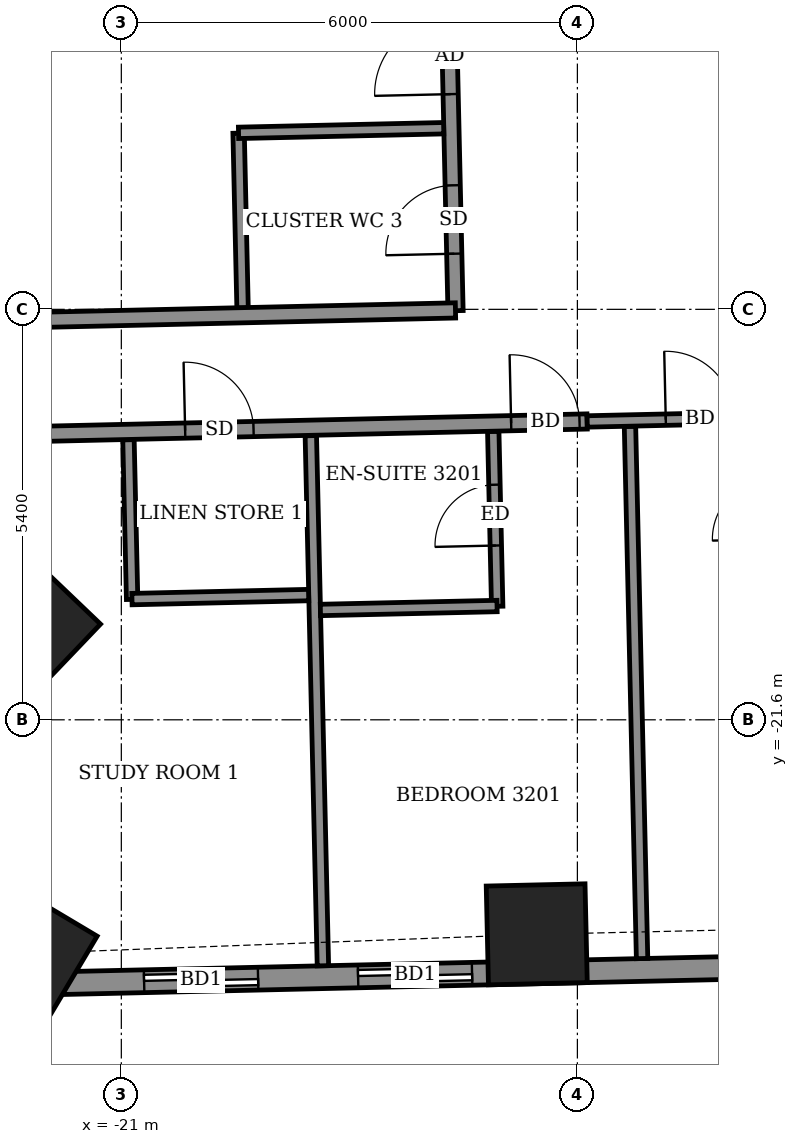
"""IFC4 building model, lengths in metres.
Left out: names, types, materials, properties, quantities, classifications, styles, units other than length and angle.
Written with IfcOpenShell. Run it as: python <this file> out.ifc"""

import sys

from ifc_helpers import new_model, si_unit, direction, frame, frame_2d, origin, origin_2d, place, context, subcontext, project, spatial, rectangle, extrude, element, fill, save


model = new_model("IFC4")
c1 = context("Model", 3, precision=1e-05, world=origin(), true_north=direction((0.0, 1.0)))
c2 = subcontext(c1, "Body", "Model", "MODEL_VIEW")
j1 = project(units=[si_unit("LENGTHUNIT", "METRE"), si_unit("PLANEANGLEUNIT", "RADIAN")], contexts=[c1])
p1 = place(None, origin())
s1 = spatial("IfcSite", under=j1, at=p1, CompositionType="ELEMENT")
p2 = place(p1, origin())
s2 = spatial("IfcBuilding", under=s1, at=p2, CompositionType="ELEMENT")
p3 = place(p2, frame((0.0, 0.0, 130.1)))
s3 = spatial("IfcBuildingStorey", under=s2, at=p3, CompositionType="ELEMENT", Elevation=130.1)
for number, where, z_axis, x_axis in (
    (1, (-22.193, -20.362, -0.55), (0.0, 0.0, 1.0), (0.723, -0.691, 0.0)),
    (2, (-22.209, -24.672, -0.55), (0.0, 0.0, 1.0), (0.859, -0.512, 0.0)),
    (3, (-15.535, -24.422, -0.55), (0.0, 0.0, 1.0), (1.0, 0.023, 0.0)),
):
    element("IfcColumn", number, at=place(p3, frame(where, z_axis=z_axis, x_axis=x_axis)), inside=s3, PredefinedType="COLUMN", context=c2, shape_type="SweptSolid", body=[
        extrude(rectangle(XDim=1.3, YDim=1.3, at=origin_2d()), origin(), (0.0, 0.0, 1.0), 3.6),
    ])
p4 = place(p3, frame((-22.396, -25.078, 0.0), z_axis=(0.0, 0.0, 1.0), x_axis=(0.99974279854, 0.022678993965, 0.0)))
e4 = element("IfcWall", 4, at=p4, inside=s3, PredefinedType="SOLIDWALL", context=c2, shape_type="SweptSolid", body=[
    extrude(rectangle(XDim=41.844, YDim=0.3, at=frame_2d((20.922, 0.0))), origin(), (0.0, 0.0, 1.0), 3.05),
])
p5 = place(p4, frame((1.696, 0.0, 0.0)))
e5 = element("IfcOpeningElement", 5, at=p5, cuts=e4, PredefinedType="OPENING", context=c2, shape_type="SweptSolid", body=[
    extrude(rectangle(XDim=1.5, YDim=2.4, at=frame_2d((0.75, 1.2))), frame((0.0, 0.16, 0.0), z_axis=(0.0, -1.0, 0.0), x_axis=(1.0, 0.0, 0.0)), (0.0, 0.0, 1.0), 0.32),
])
p6 = place(p4, frame((4.512, 0.0, 0.0)))
e6 = element("IfcOpeningElement", 6, at=p6, cuts=e4, PredefinedType="OPENING", context=c2, shape_type="SweptSolid", body=[
    extrude(rectangle(XDim=1.5, YDim=2.4, at=frame_2d((0.75, 1.2))), frame((0.0, 0.16, 0.0), z_axis=(0.0, -1.0, 0.0), x_axis=(1.0, 0.0, 0.0)), (0.0, 0.0, 1.0), 0.32),
])
p7 = place(p4, frame((9.625, 0.0, 0.0)))
e7 = element("IfcOpeningElement", 7, at=p7, cuts=e4, PredefinedType="OPENING", context=c2, shape_type="SweptSolid", body=[
    extrude(rectangle(XDim=1.5, YDim=2.4, at=frame_2d((0.75, 1.2))), frame((0.0, 0.16, 0.0), z_axis=(0.0, -1.0, 0.0), x_axis=(1.0, 0.0, 0.0)), (0.0, 0.0, 1.0), 0.32),
])
p8 = place(p4, frame((14.749, 0.0, 0.0)))
e8 = element("IfcOpeningElement", 8, at=p8, cuts=e4, PredefinedType="OPENING", context=c2, shape_type="SweptSolid", body=[
    extrude(rectangle(XDim=1.5, YDim=2.4, at=frame_2d((0.75, 1.2))), frame((0.0, 0.16, 0.0), z_axis=(0.0, -1.0, 0.0), x_axis=(1.0, 0.0, 0.0)), (0.0, 0.0, 1.0), 0.32),
])
p9 = place(p4, frame((17.861, 0.0, 0.0)))
e9 = element("IfcOpeningElement", 9, at=p9, cuts=e4, PredefinedType="OPENING", context=c2, shape_type="SweptSolid", body=[
    extrude(rectangle(XDim=1.5, YDim=2.4, at=frame_2d((0.75, 1.2))), frame((0.0, 0.16, 0.0), z_axis=(0.0, -1.0, 0.0), x_axis=(1.0, 0.0, 0.0)), (0.0, 0.0, 1.0), 0.32),
])
p10 = place(p4, frame((22.486, 0.0, 0.0)))
e10 = element("IfcOpeningElement", 10, at=p10, cuts=e4, PredefinedType="OPENING", context=c2, shape_type="SweptSolid", body=[
    extrude(rectangle(XDim=1.5, YDim=2.4, at=frame_2d((0.75, 1.2))), frame((0.0, 0.16, 0.0), z_axis=(0.0, -1.0, 0.0), x_axis=(1.0, 0.0, 0.0)), (0.0, 0.0, 1.0), 0.32),
])
p11 = place(p4, frame((25.598, 0.0, 0.0)))
e11 = element("IfcOpeningElement", 11, at=p11, cuts=e4, PredefinedType="OPENING", context=c2, shape_type="SweptSolid", body=[
    extrude(rectangle(XDim=1.5, YDim=2.4, at=frame_2d((0.75, 1.2))), frame((0.0, 0.16, 0.0), z_axis=(0.0, -1.0, 0.0), x_axis=(1.0, 0.0, 0.0)), (0.0, 0.0, 1.0), 0.32),
])
p12 = place(p4, frame((30.7, 0.0, 0.0)))
e12 = element("IfcOpeningElement", 12, at=p12, cuts=e4, PredefinedType="OPENING", context=c2, shape_type="SweptSolid", body=[
    extrude(rectangle(XDim=1.5, YDim=2.4, at=frame_2d((0.75, 1.2))), frame((0.0, 0.16, 0.0), z_axis=(0.0, -1.0, 0.0), x_axis=(1.0, 0.0, 0.0)), (0.0, 0.0, 1.0), 0.32),
])
p13 = place(p4, frame((35.81, 0.0, 0.0)))
e13 = element("IfcOpeningElement", 13, at=p13, cuts=e4, PredefinedType="OPENING", context=c2, shape_type="SweptSolid", body=[
    extrude(rectangle(XDim=1.5, YDim=2.4, at=frame_2d((0.75, 1.2))), frame((0.0, 0.16, 0.0), z_axis=(0.0, -1.0, 0.0), x_axis=(1.0, 0.0, 0.0)), (0.0, 0.0, 1.0), 0.32),
])
p14 = place(p4, frame((38.124, 0.0, 0.9)))
e14 = element("IfcOpeningElement", 14, at=p14, cuts=e4, PredefinedType="OPENING", context=c2, shape_type="SweptSolid", body=[
    extrude(rectangle(XDim=2.4, YDim=1.5, at=frame_2d((1.2, 0.75))), frame((0.0, 0.16, 0.0), z_axis=(0.0, -1.0, 0.0), x_axis=(1.0, 0.0, 0.0)), (0.0, 0.0, 1.0), 0.32),
])
p15 = place(p3, frame((-18.348, -24.836, 0.0), z_axis=(0.0, 0.0, 1.0), x_axis=(-0.02281919218, 0.999739608332, 0.0)))
e15 = element("IfcWall", 15, at=p15, inside=s3, PredefinedType="PARTITIONING", context=c2, shape_type="SweptSolid", body=[
    extrude(rectangle(XDim=6.976, YDim=0.15, at=frame_2d((3.488, 0.0))), origin(), (0.0, 0.0, 1.0), 2.55),
])
p16 = place(p3, frame((-14.149, -24.741, 0.0), z_axis=(0.0, 0.0, 1.0), x_axis=(-0.022734078158, 0.999741547446, 0.0)))
e16 = element("IfcWall", 16, at=p16, inside=s3, PredefinedType="PARTITIONING", context=c2, shape_type="SweptSolid", body=[
    extrude(rectangle(XDim=7.002, YDim=0.15, at=frame_2d((3.501, 0.0))), origin(), (0.0, 0.0, 1.0), 2.55),
])
p17 = place(p3, frame((-16.055, -20.107, 0.0), z_axis=(0.0, 0.0, 1.0), x_axis=(-0.022603288534, 0.999744513037, 0.0)))
e17 = element("IfcWall", 17, at=p17, inside=s3, PredefinedType="PARTITIONING", context=c2, shape_type="SweptSolid", body=[
    extrude(rectangle(XDim=2.301, YDim=0.15, at=frame_2d((1.15, 0.0))), origin(), (0.0, 0.0, 1.0), 3.05),
])
p18 = place(p17, frame((0.8, 0.0, 0.0)))
e18 = element("IfcOpeningElement", 18, at=p18, cuts=e17, PredefinedType="OPENING", context=c2, shape_type="SweptSolid", body=[
    extrude(rectangle(XDim=0.8, YDim=2.1, at=frame_2d((0.4, 1.05))), frame((0.0, 0.085, 0.0), z_axis=(0.0, -1.0, 0.0), x_axis=(1.0, 0.0, 0.0)), (0.0, 0.0, 1.0), 0.17),
])
p19 = place(p3, frame((-18.381, -20.155, 0.0), z_axis=(0.0, 0.0, 1.0), x_axis=(0.999749797124, 0.022368351553, 0.0)))
e19 = element("IfcWall", 19, at=p19, inside=s3, PredefinedType="PARTITIONING", context=c2, shape_type="SweptSolid", body=[
    extrude(rectangle(XDim=2.325, YDim=0.15, at=frame_2d((1.162, 0.0))), origin(), (0.0, 0.0, 1.0), 3.05),
])
p20 = place(p3, frame((-20.858, -20.016, 0.0), z_axis=(0.0, 0.0, 1.0), x_axis=(-0.022895647347, 0.999737860308, 0.0)))
e20 = element("IfcWall", 20, at=p20, inside=s3, PredefinedType="PARTITIONING", context=c2, shape_type="SweptSolid", body=[
    extrude(rectangle(XDim=2.101, YDim=0.15, at=frame_2d((1.05, 0.0))), origin(), (0.0, 0.0, 1.0), 3.05),
])
p21 = place(p3, frame((-20.86, -20.012, 0.0), z_axis=(0.0, 0.0, 1.0), x_axis=(0.99974031529, 0.022788198363, 0.0)))
e21 = element("IfcWall", 21, at=p21, inside=s3, PredefinedType="PARTITIONING", context=c2, shape_type="SweptSolid", body=[
    extrude(rectangle(XDim=2.325, YDim=0.15, at=frame_2d((1.162, 0.0))), origin(), (0.0, 0.0, 1.0), 3.05),
])
p22 = place(p3, frame((-25.709, -17.921, 0.0), z_axis=(0.0, 0.0, 1.0), x_axis=(0.999742764922, 0.022680475901, 0.0)))
e22 = element("IfcWall", 22, at=p22, inside=s3, PredefinedType="PARTITIONING", context=c2, shape_type="SweptSolid", body=[
    extrude(rectangle(XDim=10.84, YDim=0.2, at=frame_2d((5.42, 0.0))), origin(), (0.0, 0.0, 1.0), 3.05),
])
p23 = place(p22, frame((1.2, 0.0, 0.0)))
e23 = element("IfcOpeningElement", 23, at=p23, cuts=e22, PredefinedType="OPENING", context=c2, shape_type="SweptSolid", body=[
    extrude(rectangle(XDim=1.0, YDim=2.1, at=frame_2d((0.5, 1.05))), frame((0.0, 0.11, 0.0), z_axis=(0.0, -1.0, 0.0), x_axis=(1.0, 0.0, 0.0)), (0.0, 0.0, 1.0), 0.22),
])
p24 = place(p22, frame((5.55, 0.0, 0.0)))
e24 = element("IfcOpeningElement", 24, at=p24, cuts=e22, PredefinedType="OPENING", context=c2, shape_type="SweptSolid", body=[
    extrude(rectangle(XDim=0.9, YDim=2.1, at=frame_2d((0.45, 1.05))), frame((0.0, 0.11, 0.0), z_axis=(0.0, -1.0, 0.0), x_axis=(1.0, 0.0, 0.0)), (0.0, 0.0, 1.0), 0.22),
])
p25 = place(p22, frame((9.84, 0.0, 0.0)))
e25 = element("IfcOpeningElement", 25, at=p25, cuts=e22, PredefinedType="OPENING", context=c2, shape_type="SweptSolid", body=[
    extrude(rectangle(XDim=0.9, YDim=2.1, at=frame_2d((0.45, 1.05))), frame((0.0, 0.11, 0.0), z_axis=(0.0, -1.0, 0.0), x_axis=(1.0, 0.0, 0.0)), (0.0, 0.0, 1.0), 0.22),
])
p26 = place(p3, frame((-14.871, -17.675, 0.0), z_axis=(0.0, 0.0, 1.0), x_axis=(0.999742359486, 0.02269834024, 0.0)))
e26 = element("IfcWall", 26, at=p26, inside=s3, PredefinedType="PARTITIONING", context=c2, shape_type="SweptSolid", body=[
    extrude(rectangle(XDim=30.536, YDim=0.15, at=frame_2d((15.268, 0.0))), origin(), (0.0, 0.0, 1.0), 3.05),
])
p27 = place(p26, frame((1.034, 0.0, 0.0)))
e27 = element("IfcOpeningElement", 27, at=p27, cuts=e26, PredefinedType="OPENING", context=c2, shape_type="SweptSolid", body=[
    extrude(rectangle(XDim=0.9, YDim=2.1, at=frame_2d((0.45, 1.05))), frame((0.0, 0.085, 0.0), z_axis=(0.0, -1.0, 0.0), x_axis=(1.0, 0.0, 0.0)), (0.0, 0.0, 1.0), 0.17),
])
p28 = place(p26, frame((7.659, 0.0, 0.0)))
e28 = element("IfcOpeningElement", 28, at=p28, cuts=e26, PredefinedType="OPENING", context=c2, shape_type="SweptSolid", body=[
    extrude(rectangle(XDim=0.9, YDim=2.1, at=frame_2d((0.45, 1.05))), frame((0.0, 0.085, 0.0), z_axis=(0.0, -1.0, 0.0), x_axis=(1.0, 0.0, 0.0)), (0.0, 0.0, 1.0), 0.17),
])
p29 = place(p26, frame((9.459, 0.0, 0.0)))
e29 = element("IfcOpeningElement", 29, at=p29, cuts=e26, PredefinedType="OPENING", context=c2, shape_type="SweptSolid", body=[
    extrude(rectangle(XDim=0.9, YDim=2.1, at=frame_2d((0.45, 1.05))), frame((0.0, 0.085, 0.0), z_axis=(0.0, -1.0, 0.0), x_axis=(1.0, 0.0, 0.0)), (0.0, 0.0, 1.0), 0.17),
])
p30 = place(p26, frame((16.084, 0.0, 0.0)))
e30 = element("IfcOpeningElement", 30, at=p30, cuts=e26, PredefinedType="OPENING", context=c2, shape_type="SweptSolid", body=[
    extrude(rectangle(XDim=0.9, YDim=2.1, at=frame_2d((0.45, 1.05))), frame((0.0, 0.085, 0.0), z_axis=(0.0, -1.0, 0.0), x_axis=(1.0, 0.0, 0.0)), (0.0, 0.0, 1.0), 0.17),
])
p31 = place(p26, frame((17.909, 0.0, 0.0)))
e31 = element("IfcOpeningElement", 31, at=p31, cuts=e26, PredefinedType="OPENING", context=c2, shape_type="SweptSolid", body=[
    extrude(rectangle(XDim=0.9, YDim=2.1, at=frame_2d((0.45, 1.05))), frame((0.0, 0.085, 0.0), z_axis=(0.0, -1.0, 0.0), x_axis=(1.0, 0.0, 0.0)), (0.0, 0.0, 1.0), 0.17),
])
p32 = place(p26, frame((24.509, 0.0, 0.0)))
e32 = element("IfcOpeningElement", 32, at=p32, cuts=e26, PredefinedType="OPENING", context=c2, shape_type="SweptSolid", body=[
    extrude(rectangle(XDim=0.9, YDim=2.1, at=frame_2d((0.45, 1.05))), frame((0.0, 0.085, 0.0), z_axis=(0.0, -1.0, 0.0), x_axis=(1.0, 0.0, 0.0)), (0.0, 0.0, 1.0), 0.17),
])
p33 = place(p26, frame((26.309, 0.0, 0.0)))
e33 = element("IfcOpeningElement", 33, at=p33, cuts=e26, PredefinedType="OPENING", context=c2, shape_type="SweptSolid", body=[
    extrude(rectangle(XDim=0.9, YDim=2.1, at=frame_2d((0.45, 1.05))), frame((0.0, 0.085, 0.0), z_axis=(0.0, -1.0, 0.0), x_axis=(1.0, 0.0, 0.0)), (0.0, 0.0, 1.0), 0.17),
])
p34 = place(p3, frame((-19.405, -16.182, 0.0), z_axis=(0.0, 0.0, 1.0), x_axis=(-0.022605686808, 0.999744458811, 0.0)))
e34 = element("IfcWall", 34, at=p34, inside=s3, PredefinedType="PARTITIONING", context=c2, shape_type="SweptSolid", body=[
    extrude(rectangle(XDim=2.3, YDim=0.15, at=frame_2d((1.15, 0.0))), origin(), (0.0, 0.0, 1.0), 3.05),
])
p35 = place(p3, frame((-16.603, -16.218, 0.0), z_axis=(0.0, 0.0, 1.0), x_axis=(-0.022698146637, 0.999742363881, 0.0)))
e35 = element("IfcWall", 35, at=p35, inside=s3, PredefinedType="PARTITIONING", context=c2, shape_type="SweptSolid", body=[
    extrude(rectangle(XDim=28.374, YDim=0.2, at=frame_2d((14.187, 0.0))), origin(), (0.0, 0.0, 1.0), 3.05),
])
p36 = place(p35, frame((24.537, 0.0, 0.0)))
e36 = element("IfcOpeningElement", 36, at=p36, cuts=e35, PredefinedType="OPENING", context=c2, shape_type="SweptSolid", body=[
    extrude(rectangle(XDim=1.0, YDim=2.1, at=frame_2d((0.5, 1.05))), frame((0.0, 0.11, 0.0), z_axis=(0.0, -1.0, 0.0), x_axis=(1.0, 0.0, 0.0)), (0.0, 0.0, 1.0), 0.22),
])
p37 = place(p35, frame((26.724, 0.0, 0.0)))
e37 = element("IfcOpeningElement", 37, at=p37, cuts=e35, PredefinedType="OPENING", context=c2, shape_type="SweptSolid", body=[
    extrude(rectangle(XDim=0.9, YDim=2.1, at=frame_2d((0.45, 1.05))), frame((0.0, 0.11, 0.0), z_axis=(0.0, -1.0, 0.0), x_axis=(1.0, 0.0, 0.0)), (0.0, 0.0, 1.0), 0.22),
])
p38 = place(p35, frame((22.099, 0.0, 0.0)))
e38 = element("IfcOpeningElement", 38, at=p38, cuts=e35, PredefinedType="OPENING", context=c2, shape_type="SweptSolid", body=[
    extrude(rectangle(XDim=1.0, YDim=2.1, at=frame_2d((0.5, 1.05))), frame((0.0, 0.11, 0.0), z_axis=(0.0, -1.0, 0.0), x_axis=(1.0, 0.0, 0.0)), (0.0, 0.0, 1.0), 0.22),
])
p39 = place(p35, frame((16.324, 0.0, 0.0)))
e39 = element("IfcOpeningElement", 39, at=p39, cuts=e35, PredefinedType="OPENING", context=c2, shape_type="SweptSolid", body=[
    extrude(rectangle(XDim=1.0, YDim=2.1, at=frame_2d((0.5, 1.05))), frame((0.0, 0.11, 0.0), z_axis=(0.0, -1.0, 0.0), x_axis=(1.0, 0.0, 0.0)), (0.0, 0.0, 1.0), 0.22),
])
p40 = place(p35, frame((19.449, 0.0, 0.0)))
e40 = element("IfcOpeningElement", 40, at=p40, cuts=e35, PredefinedType="OPENING", context=c2, shape_type="SweptSolid", body=[
    extrude(rectangle(XDim=0.9, YDim=2.1, at=frame_2d((0.45, 1.05))), frame((0.0, 0.11, 0.0), z_axis=(0.0, -1.0, 0.0), x_axis=(1.0, 0.0, 0.0)), (0.0, 0.0, 1.0), 0.22),
])
p41 = place(p35, frame((13.574, 0.0, 0.0)))
e41 = element("IfcOpeningElement", 41, at=p41, cuts=e35, PredefinedType="OPENING", context=c2, shape_type="SweptSolid", body=[
    extrude(rectangle(XDim=1.0, YDim=2.1, at=frame_2d((0.5, 1.05))), frame((0.0, 0.11, 0.0), z_axis=(0.0, -1.0, 0.0), x_axis=(1.0, 0.0, 0.0)), (0.0, 0.0, 1.0), 0.22),
])
p42 = place(p35, frame((11.449, 0.0, 0.0)))
e42 = element("IfcOpeningElement", 42, at=p42, cuts=e35, PredefinedType="OPENING", context=c2, shape_type="SweptSolid", body=[
    extrude(rectangle(XDim=0.9, YDim=2.1, at=frame_2d((0.45, 1.05))), frame((0.0, 0.11, 0.0), z_axis=(0.0, -1.0, 0.0), x_axis=(1.0, 0.0, 0.0)), (0.0, 0.0, 1.0), 0.22),
])
p43 = place(p35, frame((8.524, 0.0, 0.0)))
e43 = element("IfcOpeningElement", 43, at=p43, cuts=e35, PredefinedType="OPENING", context=c2, shape_type="SweptSolid", body=[
    extrude(rectangle(XDim=1.0, YDim=2.1, at=frame_2d((0.5, 1.05))), frame((0.0, 0.11, 0.0), z_axis=(0.0, -1.0, 0.0), x_axis=(1.0, 0.0, 0.0)), (0.0, 0.0, 1.0), 0.22),
])
p44 = place(p35, frame((5.325, 0.0, 0.0)))
e44 = element("IfcOpeningElement", 44, at=p44, cuts=e35, PredefinedType="OPENING", context=c2, shape_type="SweptSolid", body=[
    extrude(rectangle(XDim=1.0, YDim=2.1, at=frame_2d((0.5, 1.05))), frame((0.0, 0.11, 0.0), z_axis=(0.0, -1.0, 0.0), x_axis=(1.0, 0.0, 0.0)), (0.0, 0.0, 1.0), 0.22),
])
p45 = place(p35, frame((2.85, 0.0, 0.0)))
e45 = element("IfcOpeningElement", 45, at=p45, cuts=e35, PredefinedType="OPENING", context=c2, shape_type="SweptSolid", body=[
    extrude(rectangle(XDim=1.0, YDim=2.1, at=frame_2d((0.5, 1.05))), frame((0.0, 0.11, 0.0), z_axis=(0.0, -1.0, 0.0), x_axis=(1.0, 0.0, 0.0)), (0.0, 0.0, 1.0), 0.22),
])
p46 = place(p35, frame((0.75, 0.0, 0.0)))
e46 = element("IfcOpeningElement", 46, at=p46, cuts=e35, PredefinedType="OPENING", context=c2, shape_type="SweptSolid", body=[
    extrude(rectangle(XDim=0.9, YDim=2.1, at=frame_2d((0.45, 1.05))), frame((0.0, 0.11, 0.0), z_axis=(0.0, -1.0, 0.0), x_axis=(1.0, 0.0, 0.0)), (0.0, 0.0, 1.0), 0.22),
])
p47 = place(p3, frame((-25.743, -16.422, 0.0), z_axis=(0.0, 0.0, 1.0), x_axis=(0.999741076645, 0.022754772455, 0.0)))
e47 = element("IfcWall", 47, at=p47, inside=s3, PredefinedType="PARTITIONING", context=c2, shape_type="SweptSolid", body=[
    extrude(rectangle(XDim=9.141, YDim=0.2, at=frame_2d((4.571, 0.0))), origin(), (0.0, 0.0, 1.0), 3.05),
])
p48 = place(p3, frame((-19.458, -13.878, 0.0), z_axis=(0.0, 0.0, 1.0), x_axis=(0.999744396973, 0.02260842146, 0.0)))
e48 = element("IfcWall", 48, at=p48, inside=s3, PredefinedType="PARTITIONING", context=c2, shape_type="SweptSolid", body=[
    extrude(rectangle(XDim=2.7, YDim=0.15, at=frame_2d((1.35, 0.0))), origin(), (0.0, 0.0, 1.0), 3.05),
])
p49 = place(p5, origin())
e49 = element("IfcDoor", 49, at=p49, inside=s3, OperationType="SLIDING_TO_LEFT", PredefinedType="DOOR", context=c2, shape_type="SweptSolid", body=[
    extrude(rectangle(XDim=1.5, YDim=2.4, at=frame_2d((0.75, 1.2))), frame((0.0, 0.025, 0.0), z_axis=(0.0, -1.0, 0.0), x_axis=(1.0, 0.0, 0.0)), (0.0, 0.0, 1.0), 0.05),
])
fill(e5, e49)
p50 = place(p6, origin())
e50 = element("IfcDoor", 50, at=p50, inside=s3, OperationType="SLIDING_TO_LEFT", PredefinedType="DOOR", context=c2, shape_type="SweptSolid", body=[
    extrude(rectangle(XDim=1.5, YDim=2.4, at=frame_2d((0.75, 1.2))), frame((0.0, 0.025, 0.0), z_axis=(0.0, -1.0, 0.0), x_axis=(1.0, 0.0, 0.0)), (0.0, 0.0, 1.0), 0.05),
])
fill(e6, e50)
p51 = place(p24, origin())
e51 = element("IfcDoor", 51, at=p51, inside=s3, OperationType="SINGLE_SWING_LEFT", PredefinedType="DOOR", context=c2, shape_type="SweptSolid", body=[
    extrude(rectangle(XDim=0.9, YDim=2.1, at=frame_2d((0.45, 1.05))), frame((0.0, 0.025, 0.0), z_axis=(0.0, -1.0, 0.0), x_axis=(1.0, 0.0, 0.0)), (0.0, 0.0, 1.0), 0.05),
])
fill(e24, e51)
p52 = place(p25, origin())
e52 = element("IfcDoor", 52, at=p52, inside=s3, OperationType="SINGLE_SWING_LEFT", PredefinedType="DOOR", context=c2, shape_type="SweptSolid", body=[
    extrude(rectangle(XDim=0.9, YDim=2.1, at=frame_2d((0.45, 1.05))), frame((0.0, 0.025, 0.0), z_axis=(0.0, -1.0, 0.0), x_axis=(1.0, 0.0, 0.0)), (0.0, 0.0, 1.0), 0.05),
])
fill(e25, e52)
p53 = place(p18, origin())
e53 = element("IfcDoor", 53, at=p53, inside=s3, OperationType="SINGLE_SWING_LEFT", PredefinedType="DOOR", context=c2, shape_type="SweptSolid", body=[
    extrude(rectangle(XDim=0.8, YDim=2.1, at=frame_2d((0.4, 1.05))), frame((0.0, 0.025, 0.0), z_axis=(0.0, -1.0, 0.0), x_axis=(1.0, 0.0, 0.0)), (0.0, 0.0, 1.0), 0.05),
])
fill(e18, e53)
p54 = place(p27, origin())
e54 = element("IfcDoor", 54, at=p54, inside=s3, OperationType="SINGLE_SWING_RIGHT", PredefinedType="DOOR", context=c2, shape_type="SweptSolid", body=[
    extrude(rectangle(XDim=0.9, YDim=2.1, at=frame_2d((0.45, 1.05))), frame((0.0, 0.025, 0.0), z_axis=(0.0, -1.0, 0.0), x_axis=(1.0, 0.0, 0.0)), (0.0, 0.0, 1.0), 0.05),
])
fill(e27, e54)
p55 = place(p45, origin())
e55 = element("IfcDoor", 55, at=p55, inside=s3, OperationType="SINGLE_SWING_RIGHT", PredefinedType="DOOR", context=c2, shape_type="SweptSolid", body=[
    extrude(rectangle(XDim=1.0, YDim=2.1, at=frame_2d((0.5, 1.05))), frame((0.0, 0.025, 0.0), z_axis=(0.0, -1.0, 0.0), x_axis=(1.0, 0.0, 0.0)), (0.0, 0.0, 1.0), 0.05),
])
fill(e45, e55)
p56 = place(p46, origin())
e56 = element("IfcDoor", 56, at=p56, inside=s3, OperationType="SINGLE_SWING_RIGHT", PredefinedType="DOOR", context=c2, shape_type="SweptSolid", body=[
    extrude(rectangle(XDim=0.9, YDim=2.1, at=frame_2d((0.45, 1.05))), frame((0.0, 0.025, 0.0), z_axis=(0.0, -1.0, 0.0), x_axis=(1.0, 0.0, 0.0)), (0.0, 0.0, 1.0), 0.05),
])
fill(e46, e56)
save(model, sys.argv[1])
